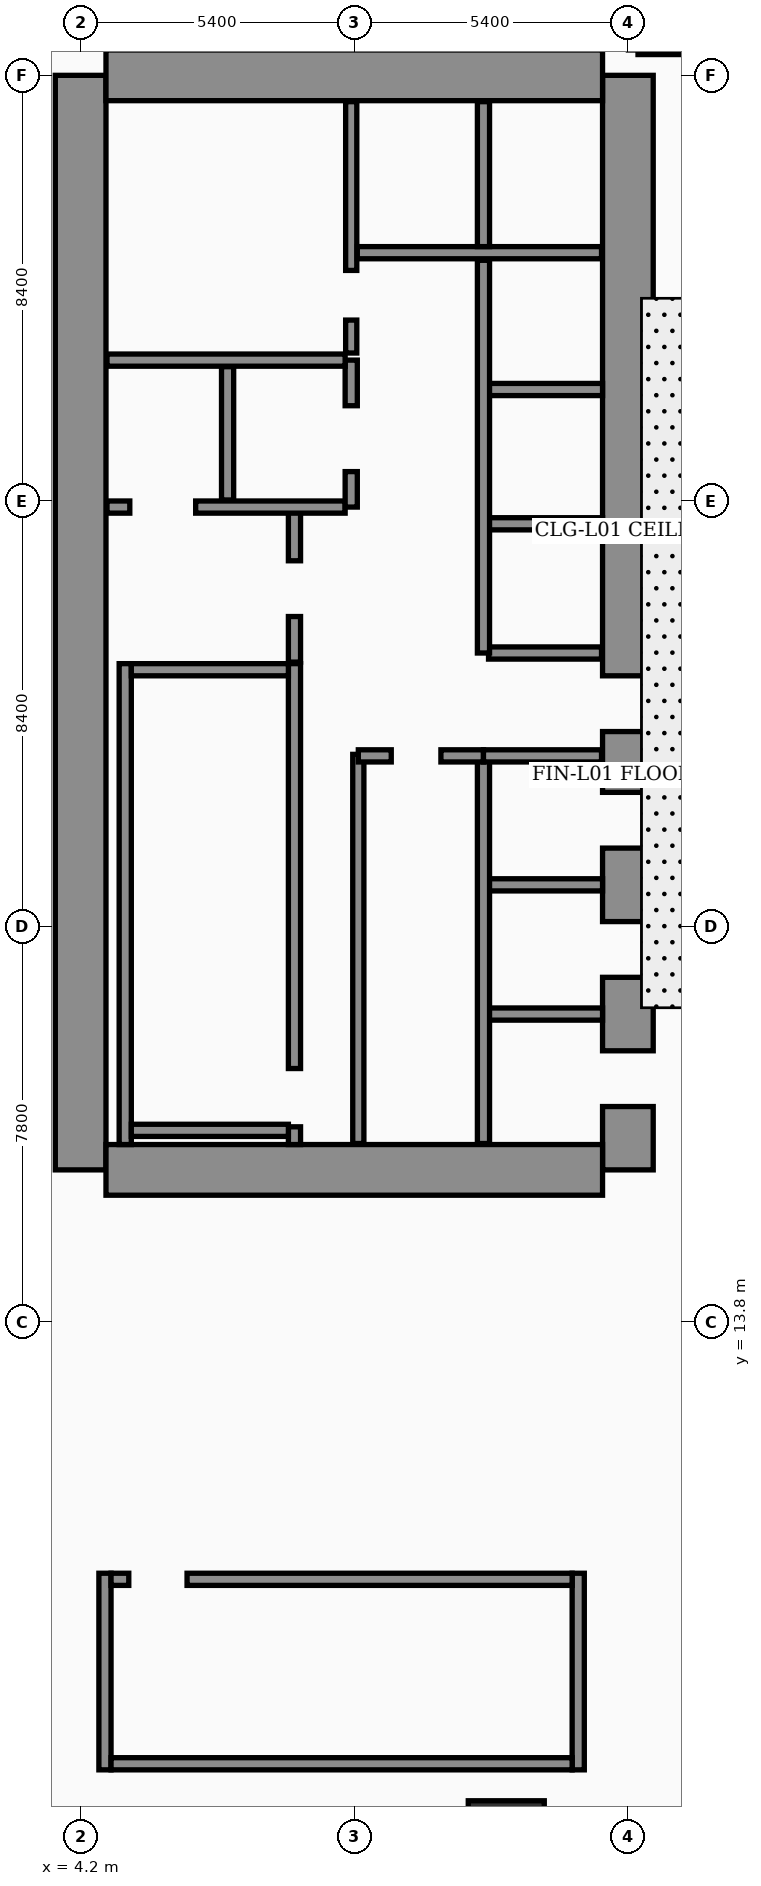
"""IFC4 building model, lengths in metres.
Left out: names, types, materials, properties, quantities, classifications, styles, units other than length and angle.
Written with IfcOpenShell. Run it as: python <this file> out.ifc"""

import sys

from ifc_helpers import new_model, si_unit, direction, frame, frame_2d, origin, origin_2d, place, context, subcontext, project, spatial, rectangle, extrude, element, fill, save


model = new_model("IFC4")
c1 = context("Model", 3, precision=1e-05, world=origin(), true_north=direction((0.0, 1.0)))
c2 = subcontext(c1, "Body", "Model", "MODEL_VIEW")
j1 = project(units=[si_unit("LENGTHUNIT", "METRE"), si_unit("PLANEANGLEUNIT", "RADIAN")], contexts=[c1])
p1 = place(None, origin())
s1 = spatial("IfcSite", under=j1, at=p1, CompositionType="ELEMENT")
p2 = place(p1, origin())
s2 = spatial("IfcBuilding", under=s1, at=p2, CompositionType="ELEMENT")
p3 = place(p2, frame((0.0, 0.0, 6.0)))
s3 = spatial("IfcBuildingStorey", under=s2, at=p3, CompositionType="ELEMENT", Elevation=6.0)
p4 = place(p3, frame((4.2, 16.8, 0.0), z_axis=(0.0, 0.0, 1.0), x_axis=(0.0, 1.0, 0.0)))
e1 = element("IfcWall", 1, at=p4, inside=s3, PredefinedType="SHEAR", context=c2, shape_type="SweptSolid", body=[
    extrude(rectangle(XDim=21.6, YDim=1.0, at=frame_2d((10.8, 0.0))), origin(), (0.0, 0.0, 1.0), 5.68),
])
p5 = place(p3, frame((15.0, 16.8, 0.0), z_axis=(0.0, 0.0, 1.0), x_axis=(0.0, 1.0, 0.0)))
e2 = element("IfcWall", 2, at=p5, inside=s3, PredefinedType="SHEAR", context=c2, shape_type="SweptSolid", body=[
    extrude(rectangle(XDim=21.6, YDim=1.0, at=frame_2d((10.8, 0.0))), origin(), (0.0, 0.0, 1.0), 5.68),
])
p6 = place(p5, frame((8.65, 0.0, 0.0)))
e3 = element("IfcOpeningElement", 3, at=p6, cuts=e2, PredefinedType="OPENING", context=c2, shape_type="SweptSolid", body=[
    extrude(rectangle(XDim=1.1, YDim=2.2, at=frame_2d((0.55, 1.1))), frame((0.0, 0.51, 0.0), z_axis=(0.0, -1.0, 0.0), x_axis=(1.0, 0.0, 0.0)), (0.0, 0.0, 1.0), 1.02),
])
p7 = place(p5, frame((1.25, 0.0, 0.0)))
e4 = element("IfcOpeningElement", 4, at=p7, cuts=e2, PredefinedType="OPENING", context=c2, shape_type="SweptSolid", body=[
    extrude(rectangle(XDim=1.1, YDim=2.2, at=frame_2d((0.55, 1.1))), frame((0.0, 0.51, 0.0), z_axis=(0.0, -1.0, 0.0), x_axis=(1.0, 0.0, 0.0)), (0.0, 0.0, 1.0), 1.02),
])
p8 = place(p5, frame((3.8, 0.0, 0.0)))
e5 = element("IfcOpeningElement", 5, at=p8, cuts=e2, PredefinedType="OPENING", context=c2, shape_type="SweptSolid", body=[
    extrude(rectangle(XDim=1.1, YDim=2.2, at=frame_2d((0.55, 1.1))), frame((0.0, 0.51, 0.0), z_axis=(0.0, -1.0, 0.0), x_axis=(1.0, 0.0, 0.0)), (0.0, 0.0, 1.0), 1.02),
])
p9 = place(p5, frame((6.35, 0.0, 0.0)))
e6 = element("IfcOpeningElement", 6, at=p9, cuts=e2, PredefinedType="OPENING", context=c2, shape_type="SweptSolid", body=[
    extrude(rectangle(XDim=1.1, YDim=2.2, at=frame_2d((0.55, 1.1))), frame((0.0, 0.51, 0.0), z_axis=(0.0, -1.0, 0.0), x_axis=(1.0, 0.0, 0.0)), (0.0, 0.0, 1.0), 1.02),
])
for number, where, z_axis, x_axis in (
    (7, (4.7, 38.4, 0.0), (0.0, 0.0, 1.0), (1.0, 0.0, 0.0)),
    (8, (4.7, 16.8, 0.0), (0.0, 0.0, 1.0), (1.0, 0.0, 0.0)),
):
    element("IfcWall", number, at=place(p3, frame(where, z_axis=z_axis, x_axis=x_axis)), inside=s3, PredefinedType="SHEAR", context=c2, shape_type="SweptSolid", body=[
        extrude(rectangle(XDim=9.8, YDim=1.0, at=frame_2d((4.9, 0.0))), origin(), (0.0, 0.0, 1.0), 5.68),
    ])
p10 = place(p3, frame((5.08, 17.3, 0.0), z_axis=(0.0, 0.0, 1.0), x_axis=(0.0, 1.0, 0.0)))
e9 = element("IfcWall", 9, at=p10, inside=s3, PredefinedType="SOLIDWALL", context=c2, shape_type="SweptSolid", body=[
    extrude(rectangle(XDim=9.49, YDim=0.24, at=frame_2d((4.745, 0.0))), origin(), (0.0, 0.0, 1.0), 5.68),
])
p11 = place(p3, frame((8.42, 17.3, 0.0), z_axis=(0.0, 0.0, 1.0), x_axis=(0.0, 1.0, 0.0)))
e10 = element("IfcWall", 10, at=p11, inside=s3, PredefinedType="SOLIDWALL", context=c2, shape_type="SweptSolid", body=[
    extrude(rectangle(XDim=9.49, YDim=0.24, at=frame_2d((4.745, 0.0))), origin(), (0.0, 0.0, 1.0), 5.68),
])
p12 = place(p11, frame((0.35, 0.0, 0.0)))
e11 = element("IfcOpeningElement", 11, at=p12, cuts=e10, PredefinedType="OPENING", context=c2, shape_type="SweptSolid", body=[
    extrude(rectangle(XDim=1.15, YDim=2.2, at=frame_2d((0.575, 1.1))), frame((0.0, 0.13, 0.0), z_axis=(0.0, -1.0, 0.0), x_axis=(1.0, 0.0, 0.0)), (0.0, 0.0, 1.0), 0.26),
])
for number, where, z_axis, x_axis in (
    (12, (5.2, 17.58, 0.0), (0.0, 0.0, 1.0), (1.0, 0.0, 0.0)),
    (13, (5.2, 26.67, 0.0), (0.0, 0.0, 1.0), (1.0, 0.0, 0.0)),
):
    element("IfcWall", number, at=place(p3, frame(where, z_axis=z_axis, x_axis=x_axis)), inside=s3, PredefinedType="SOLIDWALL", context=c2, shape_type="SweptSolid", body=[
        extrude(rectangle(XDim=3.1, YDim=0.24, at=frame_2d((1.55, 0.0))), origin(), (0.0, 0.0, 1.0), 5.68),
    ])
for number, where, z_axis, x_axis in (
    (14, (4.68, 4.96, 0.0), (0.0, 0.0, 1.0), (0.0, 1.0, 0.0)),
    (15, (14.02, 4.96, 0.0), (0.0, 0.0, 1.0), (0.0, 1.0, 0.0)),
):
    element("IfcWall", number, at=place(p3, frame(where, z_axis=z_axis, x_axis=x_axis)), inside=s3, PredefinedType="SOLIDWALL", context=c2, shape_type="SweptSolid", body=[
        extrude(rectangle(XDim=3.88, YDim=0.24, at=frame_2d((1.94, 0.0))), origin(), (0.0, 0.0, 1.0), 5.68),
    ])
p13 = place(p3, frame((4.8, 5.08, 0.0), z_axis=(0.0, 0.0, 1.0), x_axis=(1.0, 0.0, 0.0)))
e16 = element("IfcWall", 16, at=p13, inside=s3, PredefinedType="SOLIDWALL", context=c2, shape_type="SweptSolid", body=[
    extrude(rectangle(XDim=9.1, YDim=0.24, at=frame_2d((4.55, 0.0))), origin(), (0.0, 0.0, 1.0), 5.68),
])
p14 = place(p3, frame((4.8, 8.72, 0.0), z_axis=(0.0, 0.0, 1.0), x_axis=(1.0, 0.0, 0.0)))
e17 = element("IfcWall", 17, at=p14, inside=s3, PredefinedType="SOLIDWALL", context=c2, shape_type="SweptSolid", body=[
    extrude(rectangle(XDim=9.1, YDim=0.24, at=frame_2d((4.55, 0.0))), origin(), (0.0, 0.0, 1.0), 5.68),
])
p15 = place(p14, frame((0.35, 0.0, 0.0)))
e18 = element("IfcOpeningElement", 18, at=p15, cuts=e17, PredefinedType="OPENING", context=c2, shape_type="SweptSolid", body=[
    extrude(rectangle(XDim=1.15, YDim=2.2, at=frame_2d((0.575, 1.1))), frame((0.0, 0.13, 0.0), z_axis=(0.0, -1.0, 0.0), x_axis=(1.0, 0.0, 0.0)), (0.0, 0.0, 1.0), 0.26),
])
for number, where, z_axis, x_axis in (
    (19, (12.18, 19.875, 0.0), (0.0, 0.0, 1.0), (1.0, 0.0, 0.0)),
    (20, (12.18, 22.425, 0.0), (0.0, 0.0, 1.0), (1.0, 0.0, 0.0)),
    (21, (12.18, 29.55, 0.0), (0.0, 0.0, 1.0), (1.0, 0.0, 0.0)),
    (22, (12.18, 32.2, 0.0), (0.0, 0.0, 1.0), (1.0, 0.0, 0.0)),
):
    element("IfcWall", number, at=place(p3, frame(where, z_axis=z_axis, x_axis=x_axis)), inside=s3, PredefinedType="SOLIDWALL", context=c2, shape_type="SweptSolid", body=[
        extrude(rectangle(XDim=2.32, YDim=0.24, at=frame_2d((1.16, 0.0))), origin(), (0.0, 0.0, 1.0), 5.68),
    ])
p16 = place(p3, frame((12.6, 3.6, 0.0), z_axis=(0.0, 0.0, 1.0), x_axis=(1.0, 0.0, 0.0)))
e23 = element("IfcColumn", 23, at=p16, inside=s3, PredefinedType="COLUMN", context=c2, shape_type="SweptSolid", body=[
    extrude(rectangle(XDim=1.5, YDim=1.5, at=origin_2d()), origin(), (0.0, 0.0, 1.0), 5.68),
])
p17 = place(p3, frame((8.42, 26.82, 0.0), z_axis=(0.0, 0.0, 1.0), x_axis=(0.0, 1.0, 0.0)))
e24 = element("IfcWall", 24, at=p17, inside=s3, PredefinedType="SOLIDWALL", context=c2, shape_type="SweptSolid", body=[
    extrude(rectangle(XDim=3.0, YDim=0.24, at=frame_2d((1.5, 0.0))), origin(), (0.0, 0.0, 1.0), 5.68),
])
p18 = place(p17, frame((0.9, 0.0, 0.0)))
e25 = element("IfcOpeningElement", 25, at=p18, cuts=e24, PredefinedType="OPENING", context=c2, shape_type="SweptSolid", body=[
    extrude(rectangle(XDim=1.1, YDim=2.2, at=frame_2d((0.55, 1.1))), frame((0.0, 0.13, 0.0), z_axis=(0.0, -1.0, 0.0), x_axis=(1.0, 0.0, 0.0)), (0.0, 0.0, 1.0), 0.26),
])
p19 = place(p3, frame((4.72, 29.88, 0.0), z_axis=(0.0, 0.0, 1.0), x_axis=(1.0, 0.0, 0.0)))
e26 = element("IfcWall", 26, at=p19, inside=s3, PredefinedType="SOLIDWALL", context=c2, shape_type="SweptSolid", body=[
    extrude(rectangle(XDim=4.7, YDim=0.24, at=frame_2d((2.35, 0.0))), origin(), (0.0, 0.0, 1.0), 5.68),
])
p20 = place(p19, frame((0.45, 0.0, 0.0)))
e27 = element("IfcOpeningElement", 27, at=p20, cuts=e26, PredefinedType="OPENING", context=c2, shape_type="SweptSolid", body=[
    extrude(rectangle(XDim=1.3, YDim=2.35, at=frame_2d((0.65, 1.175))), frame((0.0, 0.13, 0.0), z_axis=(0.0, -1.0, 0.0), x_axis=(1.0, 0.0, 0.0)), (0.0, 0.0, 1.0), 0.26),
])
p21 = place(p3, frame((7.1, 30.02, 0.0), z_axis=(0.0, 0.0, 1.0), x_axis=(0.0, 1.0, 0.0)))
e28 = element("IfcWall", 28, at=p21, inside=s3, PredefinedType="SOLIDWALL", context=c2, shape_type="SweptSolid", body=[
    extrude(rectangle(XDim=2.63, YDim=0.24, at=frame_2d((1.315, 0.0))), origin(), (0.0, 0.0, 1.0), 5.68),
])
p22 = place(p3, frame((9.54, 29.88, 0.0), z_axis=(0.0, 0.0, 1.0), x_axis=(0.0, 1.0, 0.0)))
e29 = element("IfcWall", 29, at=p22, inside=s3, PredefinedType="SOLIDWALL", context=c2, shape_type="SweptSolid", body=[
    extrude(rectangle(XDim=2.9, YDim=0.24, at=frame_2d((1.45, 0.0))), origin(), (0.0, 0.0, 1.0), 5.68),
])
p23 = place(p22, frame((0.7, 0.0, 0.0)))
e30 = element("IfcOpeningElement", 30, at=p23, cuts=e29, PredefinedType="OPENING", context=c2, shape_type="SweptSolid", body=[
    extrude(rectangle(XDim=1.3, YDim=2.35, at=frame_2d((0.65, 1.175))), frame((0.0, 0.13, 0.0), z_axis=(0.0, -1.0, 0.0), x_axis=(1.0, 0.0, 0.0)), (0.0, 0.0, 1.0), 0.26),
])
p24 = place(p3, frame((4.72, 32.78, 0.0), z_axis=(0.0, 0.0, 1.0), x_axis=(1.0, 0.0, 0.0)))
e31 = element("IfcWall", 31, at=p24, inside=s3, PredefinedType="SOLIDWALL", context=c2, shape_type="SweptSolid", body=[
    extrude(rectangle(XDim=4.7, YDim=0.24, at=frame_2d((2.35, 0.0))), origin(), (0.0, 0.0, 1.0), 5.68),
])
p25 = place(p3, frame((9.68, 17.32, 0.0), z_axis=(0.0, 0.0, 1.0), x_axis=(0.0, 1.0, 0.0)))
e32 = element("IfcWall", 32, at=p25, inside=s3, PredefinedType="SOLIDWALL", context=c2, shape_type="SweptSolid", body=[
    extrude(rectangle(XDim=7.68, YDim=0.22, at=frame_2d((3.84, 0.0))), origin(), (0.0, 0.0, 1.0), 5.68),
])
p26 = place(p3, frame((9.54, 32.92, 0.0), z_axis=(0.0, 0.0, 1.0), x_axis=(0.0, 1.0, 0.0)))
e33 = element("IfcWall", 33, at=p26, inside=s3, PredefinedType="SOLIDWALL", context=c2, shape_type="SweptSolid", body=[
    extrude(rectangle(XDim=4.96, YDim=0.22, at=frame_2d((2.48, 0.0))), origin(), (0.0, 0.0, 1.0), 5.68),
])
p27 = place(p26, frame((0.65, 0.0, 0.0)))
e34 = element("IfcOpeningElement", 34, at=p27, cuts=e33, PredefinedType="OPENING", context=c2, shape_type="SweptSolid", body=[
    extrude(rectangle(XDim=0.98, YDim=2.15, at=frame_2d((0.49, 1.075))), frame((0.0, 0.12, 0.0), z_axis=(0.0, -1.0, 0.0), x_axis=(1.0, 0.0, 0.0)), (0.0, 0.0, 1.0), 0.24),
])
p28 = place(p3, frame((12.15, 17.32, 0.0), z_axis=(0.0, 0.0, 1.0), x_axis=(0.0, 1.0, 0.0)))
e35 = element("IfcWall", 35, at=p28, inside=s3, PredefinedType="SOLIDWALL", context=c2, shape_type="SweptSolid", body=[
    extrude(rectangle(XDim=7.65, YDim=0.24, at=frame_2d((3.825, 0.0))), origin(), (0.0, 0.0, 1.0), 5.68),
])
p29 = place(p3, frame((9.68, 24.97, 0.0), z_axis=(0.0, 0.0, 1.0), x_axis=(1.0, 0.0, 0.0)))
e36 = element("IfcWall", 36, at=p29, inside=s3, PredefinedType="SOLIDWALL", context=c2, shape_type="SweptSolid", body=[
    extrude(rectangle(XDim=2.47, YDim=0.24, at=frame_2d((1.235, 0.0))), origin(), (0.0, 0.0, 1.0), 5.68),
])
p30 = place(p29, frame((0.65, 0.0, 0.0)))
e37 = element("IfcOpeningElement", 37, at=p30, cuts=e36, PredefinedType="OPENING", context=c2, shape_type="SweptSolid", body=[
    extrude(rectangle(XDim=0.98, YDim=2.15, at=frame_2d((0.49, 1.075))), frame((0.0, 0.13, 0.0), z_axis=(0.0, -1.0, 0.0), x_axis=(1.0, 0.0, 0.0)), (0.0, 0.0, 1.0), 0.26),
])
p31 = place(p3, frame((12.15, 24.97, 0.0), z_axis=(0.0, 0.0, 1.0), x_axis=(1.0, 0.0, 0.0)))
e38 = element("IfcWall", 38, at=p31, inside=s3, PredefinedType="SOLIDWALL", context=c2, shape_type="SweptSolid", body=[
    extrude(rectangle(XDim=2.33, YDim=0.24, at=frame_2d((1.165, 0.0))), origin(), (0.0, 0.0, 1.0), 4.88),
])
p32 = place(p3, frame((12.25, 27.0, 0.0), z_axis=(0.0, 0.0, 1.0), x_axis=(1.0, 0.0, 0.0)))
e39 = element("IfcWall", 39, at=p32, inside=s3, PredefinedType="SOLIDWALL", context=c2, shape_type="SweptSolid", body=[
    extrude(rectangle(XDim=2.23, YDim=0.24, at=frame_2d((1.115, 0.0))), origin(), (0.0, 0.0, 1.0), 5.68),
])
p33 = place(p3, frame((12.15, 27.0, 0.0), z_axis=(0.0, 0.0, 1.0), x_axis=(0.0, 1.0, 0.0)))
e40 = element("IfcWall", 40, at=p33, inside=s3, PredefinedType="SOLIDWALL", context=c2, shape_type="SweptSolid", body=[
    extrude(rectangle(XDim=7.75, YDim=0.24, at=frame_2d((3.875, 0.0))), origin(), (0.0, 0.0, 1.0), 5.68),
])
p34 = place(p3, frame((9.66, 34.9, 0.0), z_axis=(0.0, 0.0, 1.0), x_axis=(1.0, 0.0, 0.0)))
e41 = element("IfcWall", 41, at=p34, inside=s3, PredefinedType="SOLIDWALL", context=c2, shape_type="SweptSolid", body=[
    extrude(rectangle(XDim=4.82, YDim=0.24, at=frame_2d((2.41, 0.0))), origin(), (0.0, 0.0, 1.0), 5.68),
])
p35 = place(p3, frame((12.15, 35.02, 0.0), z_axis=(0.0, 0.0, 1.0), x_axis=(0.0, 1.0, 0.0)))
e42 = element("IfcWall", 42, at=p35, inside=s3, PredefinedType="SOLIDWALL", context=c2, shape_type="SweptSolid", body=[
    extrude(rectangle(XDim=2.86, YDim=0.24, at=frame_2d((1.43, 0.0))), origin(), (0.0, 0.0, 1.0), 5.68),
])
p36 = place(p3, frame((15.2, 38.9, 0.0), z_axis=(0.0, 0.0, 1.0), x_axis=(1.0, 0.0, 0.0)))
e43 = element("IfcWall", 43, at=p36, inside=s3, PredefinedType="PARTITIONING", context=c2, shape_type="SweptSolid", body=[
    extrude(rectangle(XDim=18.1, YDim=0.18, at=frame_2d((9.05, 0.0))), origin(), (0.0, 0.0, 1.0), 4.88),
])
p37 = place(p36, frame((2.2, 0.0, 0.0)))
e44 = element("IfcOpeningElement", 44, at=p37, cuts=e43, PredefinedType="OPENING", context=c2, shape_type="SweptSolid", body=[
    extrude(rectangle(XDim=1.02, YDim=2.2, at=frame_2d((0.51, 1.1))), frame((0.0, 0.1, 0.0), z_axis=(0.0, -1.0, 0.0), x_axis=(1.0, 0.0, 0.0)), (0.0, 0.0, 1.0), 0.2),
])
p38 = place(p36, frame((8.2, 0.0, 0.0)))
e45 = element("IfcOpeningElement", 45, at=p38, cuts=e43, PredefinedType="OPENING", context=c2, shape_type="SweptSolid", body=[
    extrude(rectangle(XDim=1.02, YDim=2.2, at=frame_2d((0.51, 1.1))), frame((0.0, 0.1, 0.0), z_axis=(0.0, -1.0, 0.0), x_axis=(1.0, 0.0, 0.0)), (0.0, 0.0, 1.0), 0.2),
])
p39 = place(p36, frame((14.2, 0.0, 0.0)))
e46 = element("IfcOpeningElement", 46, at=p39, cuts=e43, PredefinedType="OPENING", context=c2, shape_type="SweptSolid", body=[
    extrude(rectangle(XDim=1.02, YDim=2.2, at=frame_2d((0.51, 1.1))), frame((0.0, 0.1, 0.0), z_axis=(0.0, -1.0, 0.0), x_axis=(1.0, 0.0, 0.0)), (0.0, 0.0, 1.0), 0.2),
])
p40 = place(p18, origin())
e47 = element("IfcDoor", 47, at=p40, inside=s3, OperationType="SINGLE_SWING_RIGHT", PredefinedType="DOOR", context=c2, shape_type="SweptSolid", body=[
    extrude(rectangle(XDim=1.1, YDim=2.2, at=frame_2d((0.55, 1.1))), frame((0.0, 0.025, 0.0), z_axis=(0.0, -1.0, 0.0), x_axis=(1.0, 0.0, 0.0)), (0.0, 0.0, 1.0), 0.05),
])
fill(e25, e47)
p41 = place(p20, origin())
e48 = element("IfcDoor", 48, at=p41, inside=s3, OperationType="DOUBLE_DOOR_SLIDING", PredefinedType="DOOR", context=c2, shape_type="SweptSolid", body=[
    extrude(rectangle(XDim=1.3, YDim=2.35, at=frame_2d((0.65, 1.175))), frame((0.0, 0.025, 0.0), z_axis=(0.0, -1.0, 0.0), x_axis=(1.0, 0.0, 0.0)), (0.0, 0.0, 1.0), 0.05),
])
fill(e27, e48)
p42 = place(p23, origin())
e49 = element("IfcDoor", 49, at=p42, inside=s3, OperationType="DOUBLE_DOOR_SLIDING", PredefinedType="DOOR", context=c2, shape_type="SweptSolid", body=[
    extrude(rectangle(XDim=1.3, YDim=2.35, at=frame_2d((0.65, 1.175))), frame((0.0, 0.025, 0.0), z_axis=(0.0, -1.0, 0.0), x_axis=(1.0, 0.0, 0.0)), (0.0, 0.0, 1.0), 0.05),
])
fill(e30, e49)
p43 = place(p27, origin())
e50 = element("IfcDoor", 50, at=p43, inside=s3, OperationType="SINGLE_SWING_LEFT", PredefinedType="DOOR", context=c2, shape_type="SweptSolid", body=[
    extrude(rectangle(XDim=0.98, YDim=2.15, at=frame_2d((0.49, 1.075))), frame((0.0, 0.025, 0.0), z_axis=(0.0, -1.0, 0.0), x_axis=(1.0, 0.0, 0.0)), (0.0, 0.0, 1.0), 0.05),
])
fill(e34, e50)
p44 = place(p30, origin())
e51 = element("IfcDoor", 51, at=p44, inside=s3, OperationType="SINGLE_SWING_LEFT", PredefinedType="DOOR", context=c2, shape_type="SweptSolid", body=[
    extrude(rectangle(XDim=0.98, YDim=2.15, at=frame_2d((0.49, 1.075))), frame((0.0, 0.025, 0.0), z_axis=(0.0, -1.0, 0.0), x_axis=(1.0, 0.0, 0.0)), (0.0, 0.0, 1.0), 0.05),
])
fill(e37, e51)
p45 = place(p12, origin())
e52 = element("IfcDoor", 52, at=p45, inside=s3, OperationType="SINGLE_SWING_LEFT", PredefinedType="DOOR", context=c2, shape_type="SweptSolid", body=[
    extrude(rectangle(XDim=1.15, YDim=2.2, at=frame_2d((0.575, 1.1))), frame((0.0, 0.025, 0.0), z_axis=(0.0, -1.0, 0.0), x_axis=(1.0, 0.0, 0.0)), (0.0, 0.0, 1.0), 0.05),
])
fill(e11, e52)
p46 = place(p15, origin())
e53 = element("IfcDoor", 53, at=p46, inside=s3, OperationType="SINGLE_SWING_RIGHT", PredefinedType="DOOR", context=c2, shape_type="SweptSolid", body=[
    extrude(rectangle(XDim=1.15, YDim=2.2, at=frame_2d((0.575, 1.1))), frame((0.0, 0.025, 0.0), z_axis=(0.0, -1.0, 0.0), x_axis=(1.0, 0.0, 0.0)), (0.0, 0.0, 1.0), 0.05),
])
fill(e18, e53)
p47 = place(p6, origin())
e54 = element("IfcDoor", 54, at=p47, inside=s3, OperationType="SINGLE_SWING_RIGHT", PredefinedType="DOOR", context=c2, shape_type="SweptSolid", body=[
    extrude(rectangle(XDim=1.1, YDim=2.2, at=frame_2d((0.55, 1.1))), frame((0.0, 0.025, 0.0), z_axis=(0.0, -1.0, 0.0), x_axis=(1.0, 0.0, 0.0)), (0.0, 0.0, 1.0), 0.05),
])
fill(e3, e54)
p48 = place(p7, origin())
e55 = element("IfcDoor", 55, at=p48, inside=s3, OperationType="DOUBLE_DOOR_SLIDING", PredefinedType="DOOR", context=c2, shape_type="SweptSolid", body=[
    extrude(rectangle(XDim=1.1, YDim=2.2, at=frame_2d((0.55, 1.1))), frame((0.0, 0.025, 0.0), z_axis=(0.0, -1.0, 0.0), x_axis=(1.0, 0.0, 0.0)), (0.0, 0.0, 1.0), 0.05),
])
fill(e4, e55)
p49 = place(p8, origin())
e56 = element("IfcDoor", 56, at=p49, inside=s3, OperationType="DOUBLE_DOOR_SLIDING", PredefinedType="DOOR", context=c2, shape_type="SweptSolid", body=[
    extrude(rectangle(XDim=1.1, YDim=2.2, at=frame_2d((0.55, 1.1))), frame((0.0, 0.025, 0.0), z_axis=(0.0, -1.0, 0.0), x_axis=(1.0, 0.0, 0.0)), (0.0, 0.0, 1.0), 0.05),
])
fill(e5, e56)
p50 = place(p9, origin())
e57 = element("IfcDoor", 57, at=p50, inside=s3, OperationType="DOUBLE_DOOR_SLIDING", PredefinedType="DOOR", context=c2, shape_type="SweptSolid", body=[
    extrude(rectangle(XDim=1.1, YDim=2.2, at=frame_2d((0.55, 1.1))), frame((0.0, 0.025, 0.0), z_axis=(0.0, -1.0, 0.0), x_axis=(1.0, 0.0, 0.0)), (0.0, 0.0, 1.0), 0.05),
])
fill(e6, e57)
save(model, sys.argv[1])
